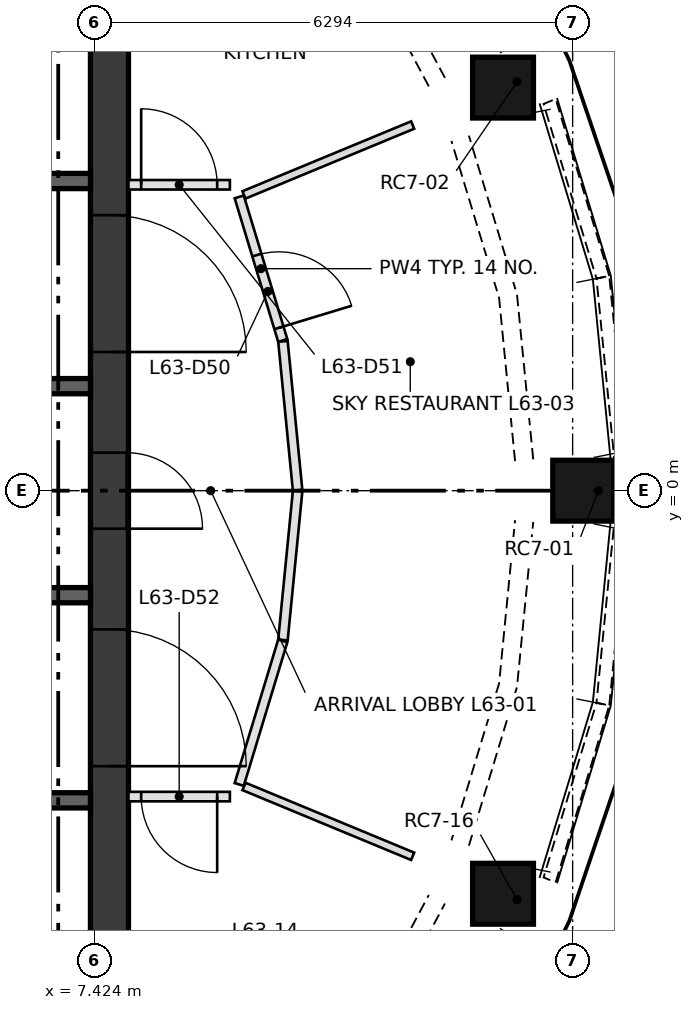
"""IFC4 building model, lengths in metres.
Left out: names, types, materials, properties, quantities, classifications, styles, units other than length and angle.
Written with IfcOpenShell. Run it as: python <this file> out.ifc"""

import sys

from ifc_helpers import new_model, si_unit, direction, frame, frame_2d, origin, origin_2d, place, context, subcontext, project, spatial, polyline, rectangle, outline, extrude, element, fill, save


model = new_model("IFC4")
c1 = context("Model", 3, precision=1e-05, world=origin(), true_north=direction((0.0, 1.0)))
c2 = subcontext(c1, "Body", "Model", "MODEL_VIEW")
j1 = project(units=[si_unit("LENGTHUNIT", "METRE"), si_unit("PLANEANGLEUNIT", "RADIAN")], contexts=[c1])
p1 = place(None, origin())
s1 = spatial("IfcSite", under=j1, at=p1, CompositionType="ELEMENT")
p2 = place(p1, origin())
s2 = spatial("IfcBuilding", under=s1, at=p2, CompositionType="ELEMENT")
p3 = place(p2, frame((0.0, 0.0, 231.2)))
s3 = spatial("IfcBuildingStorey", under=s2, at=p3, CompositionType="ELEMENT", Elevation=231.2)
p4 = place(p3, frame((14.057, 0.0, 0.5), z_axis=(0.0, 0.0, 1.0), x_axis=(0.0, -1.0, 0.0)))
e1 = element("IfcColumn", 1, at=p4, inside=s3, PredefinedType="COLUMN", context=c2, shape_type="SweptSolid", body=[
    extrude(rectangle(XDim=0.8, YDim=0.8, at=origin_2d()), origin(), (0.0, -0.275, 0.962), 3.328),
])
for number, where, z_axis, x_axis in (
    (2, (12.987, 5.379, 0.5), (0.0, 0.0, 1.0), (0.383, -0.924, 0.0)),
    (3, (12.987, -5.379, 0.5), (0.0, 0.0, 1.0), (-0.383, -0.924, 0.0)),
):
    element("IfcColumn", number, at=place(p3, frame(where, z_axis=z_axis, x_axis=x_axis)), inside=s3, PredefinedType="COLUMN", context=c2, shape_type="SweptSolid", body=[
        extrude(rectangle(XDim=0.8, YDim=0.8, at=origin_2d()), origin(), (0.0, -0.275, 0.962), 3.328),
    ])
p5 = place(p3, frame((7.624, -7.374, 0.0), z_axis=(0.0, 0.0, 1.0), x_axis=(0.0, 1.0, 0.0)))
e4 = element("IfcWall", 4, at=p5, inside=s3, PredefinedType="SHEAR", context=c2, shape_type="SweptSolid", body=[
    extrude(rectangle(XDim=14.748, YDim=0.5, at=frame_2d((7.374, 0.0))), origin(), (0.0, 0.0, 1.0), 3.3),
])
p6 = place(p5, frame((6.874, 0.0, 0.0)))
e5 = element("IfcOpeningElement", 5, at=p6, cuts=e4, PredefinedType="OPENING", context=c2, shape_type="SweptSolid", body=[
    extrude(rectangle(XDim=1.0, YDim=2.1, at=frame_2d((0.5, 1.05))), frame((0.0, 0.26, 0.0), z_axis=(0.0, -1.0, 0.0), x_axis=(1.0, 0.0, 0.0)), (0.0, 0.0, 1.0), 0.52),
])
p7 = place(p5, frame((3.75, 0.0, 0.0)))
e6 = element("IfcOpeningElement", 6, at=p7, cuts=e4, PredefinedType="OPENING", context=c2, shape_type="SweptSolid", body=[
    extrude(rectangle(XDim=1.8, YDim=2.1, at=frame_2d((0.9, 1.05))), frame((0.0, 0.26, 0.0), z_axis=(0.0, -1.0, 0.0), x_axis=(1.0, 0.0, 0.0)), (0.0, 0.0, 1.0), 0.52),
])
p8 = place(p5, frame((9.198, 0.0, 0.0)))
e7 = element("IfcOpeningElement", 7, at=p8, cuts=e4, PredefinedType="OPENING", context=c2, shape_type="SweptSolid", body=[
    extrude(rectangle(XDim=1.8, YDim=2.1, at=frame_2d((0.9, 1.05))), frame((0.0, 0.26, 0.0), z_axis=(0.0, -1.0, 0.0), x_axis=(1.0, 0.0, 0.0)), (0.0, 0.0, 1.0), 0.52),
])
p9 = place(p3, frame((-7.374, -4.074, 0.0), z_axis=(0.0, 0.0, 1.0), x_axis=(1.0, 0.0, 0.0)))
e8 = element("IfcWall", 8, at=p9, inside=s3, PredefinedType="SHEAR", context=c2, shape_type="SweptSolid", body=[
    extrude(rectangle(XDim=14.748, YDim=0.2, at=frame_2d((7.374, 0.0))), origin(), (0.0, 0.0, 1.0), 3.3),
])
p10 = place(p9, frame((1.319, 0.0, 0.0)))
e9 = element("IfcOpeningElement", 9, at=p10, cuts=e8, PredefinedType="OPENING", context=c2, shape_type="SweptSolid", body=[
    extrude(rectangle(XDim=1.1, YDim=2.1, at=frame_2d((0.55, 1.05))), frame((0.0, 0.11, 0.0), z_axis=(0.0, -1.0, 0.0), x_axis=(1.0, 0.0, 0.0)), (0.0, 0.0, 1.0), 0.22),
])
p11 = place(p9, frame((4.456, 0.0, 0.0)))
e10 = element("IfcOpeningElement", 10, at=p11, cuts=e8, PredefinedType="OPENING", context=c2, shape_type="SweptSolid", body=[
    extrude(rectangle(XDim=1.1, YDim=2.1, at=frame_2d((0.55, 1.05))), frame((0.0, 0.11, 0.0), z_axis=(0.0, -1.0, 0.0), x_axis=(1.0, 0.0, 0.0)), (0.0, 0.0, 1.0), 0.22),
])
p12 = place(p9, frame((7.689, 0.0, 0.0)))
e11 = element("IfcOpeningElement", 11, at=p12, cuts=e8, PredefinedType="OPENING", context=c2, shape_type="SweptSolid", body=[
    extrude(rectangle(XDim=1.0, YDim=2.1, at=frame_2d((0.5, 1.05))), frame((0.0, 0.11, 0.0), z_axis=(0.0, -1.0, 0.0), x_axis=(1.0, 0.0, 0.0)), (0.0, 0.0, 1.0), 0.22),
])
p13 = place(p9, frame((10.413, 0.0, 0.0)))
e12 = element("IfcOpeningElement", 12, at=p13, cuts=e8, PredefinedType="OPENING", context=c2, shape_type="SweptSolid", body=[
    extrude(rectangle(XDim=1.0, YDim=2.1, at=frame_2d((0.5, 1.05))), frame((0.0, 0.11, 0.0), z_axis=(0.0, -1.0, 0.0), x_axis=(1.0, 0.0, 0.0)), (0.0, 0.0, 1.0), 0.22),
])
p14 = place(p9, frame((12.935, 0.0, 0.0)))
e13 = element("IfcOpeningElement", 13, at=p14, cuts=e8, PredefinedType="OPENING", context=c2, shape_type="SweptSolid", body=[
    extrude(rectangle(XDim=1.0, YDim=2.1, at=frame_2d((0.5, 1.05))), frame((0.0, 0.11, 0.0), z_axis=(0.0, -1.0, 0.0), x_axis=(1.0, 0.0, 0.0)), (0.0, 0.0, 1.0), 0.22),
])
p15 = place(p3, frame((0.0, 4.074, 0.0), z_axis=(0.0, 0.0, 1.0), x_axis=(1.0, 0.0, 0.0)))
e14 = element("IfcWall", 14, at=p15, inside=s3, PredefinedType="SHEAR", context=c2, shape_type="SweptSolid", body=[
    extrude(rectangle(XDim=7.374, YDim=0.2, at=frame_2d((3.687, 0.0))), origin(), (0.0, 0.0, 1.0), 3.3),
])
p16 = place(p15, frame((0.384, 0.0, 0.0)))
e15 = element("IfcOpeningElement", 15, at=p16, cuts=e14, PredefinedType="OPENING", context=c2, shape_type="SweptSolid", body=[
    extrude(rectangle(XDim=1.0, YDim=2.1, at=frame_2d((0.5, 1.05))), frame((0.0, 0.11, 0.0), z_axis=(0.0, -1.0, 0.0), x_axis=(1.0, 0.0, 0.0)), (0.0, 0.0, 1.0), 0.22),
])
p17 = place(p15, frame((2.153, 0.0, 0.0)))
e16 = element("IfcOpeningElement", 16, at=p17, cuts=e14, PredefinedType="OPENING", context=c2, shape_type="SweptSolid", body=[
    extrude(rectangle(XDim=1.0, YDim=2.1, at=frame_2d((0.5, 1.05))), frame((0.0, 0.11, 0.0), z_axis=(0.0, -1.0, 0.0), x_axis=(1.0, 0.0, 0.0)), (0.0, 0.0, 1.0), 0.22),
])
p18 = place(p15, frame((3.921, 0.0, 0.0)))
e17 = element("IfcOpeningElement", 17, at=p18, cuts=e14, PredefinedType="OPENING", context=c2, shape_type="SweptSolid", body=[
    extrude(rectangle(XDim=1.0, YDim=2.1, at=frame_2d((0.5, 1.05))), frame((0.0, 0.11, 0.0), z_axis=(0.0, -1.0, 0.0), x_axis=(1.0, 0.0, 0.0)), (0.0, 0.0, 1.0), 0.22),
])
p19 = place(p15, frame((5.79, 0.0, 0.0)))
e18 = element("IfcOpeningElement", 18, at=p19, cuts=e14, PredefinedType="OPENING", context=c2, shape_type="SweptSolid", body=[
    extrude(rectangle(XDim=0.8, YDim=2.1, at=frame_2d((0.4, 1.05))), frame((0.0, 0.11, 0.0), z_axis=(0.0, -1.0, 0.0), x_axis=(1.0, 0.0, 0.0)), (0.0, 0.0, 1.0), 0.22),
])
for number, where, z_axis, x_axis in (
    (19, (4.374, -1.375, 0.0), (0.0, 0.0, 1.0), (1.0, 0.0, 0.0)),
    (20, (4.374, 1.375, 0.0), (0.0, 0.0, 1.0), (1.0, 0.0, 0.0)),
):
    element("IfcWall", number, at=place(p3, frame(where, z_axis=z_axis, x_axis=x_axis)), inside=s3, PredefinedType="SHEAR", context=c2, shape_type="SweptSolid", body=[
        extrude(rectangle(XDim=3.0, YDim=0.2, at=frame_2d((1.5, 0.0))), origin(), (0.0, 0.0, 1.0), 3.3),
    ])
p20 = place(p3, frame((14.439, 0.403, 0.0), z_axis=(0.93035064291, 0.091755306795, 0.355005133642), x_axis=(-0.098145054237, 0.995172119915, -8.475565e-06)))
e21 = element("IfcWall", 21, at=p20, inside=s3, PredefinedType="SOLIDWALL", context=c2, shape_type="SweptSolid", body=[
    extrude(outline(polyline([(0.0, 0.0), (2.433, -1.388e-17), (2.417, 0.481), (0.017, 0.481), (0.0, 0.0)])), origin(), (0.0, 0.0, -1.0), 0.3),
])
p21 = place(p3, frame((14.2, 2.824, 0.0), z_axis=(0.894721380135, 0.271074750296, 0.354953703573), x_axis=(-0.289959608839, 0.957038883806, 1.1226683e-05)))
e22 = element("IfcWall", 22, at=p21, inside=s3, PredefinedType="SOLIDWALL", context=c2, shape_type="SweptSolid", body=[
    extrude(outline(polyline([(0.0, 0.0), (2.434, -5.551e-17), (2.417, 0.481), (0.017, 0.481), (0.0, 0.0)])), origin(), (0.0, 0.0, -1.0), 0.3),
])
p22 = place(p3, frame((13.186, 5.898, 0.0), z_axis=(0.824332600798, 0.441016524886, 0.35493687895), x_axis=(-0.471734377661, 0.881740708382, 1.0715603e-05)))
e23 = element("IfcWall", 23, at=p22, inside=s3, PredefinedType="SOLIDWALL", context=c2, shape_type="SweptSolid", body=[
    extrude(outline(polyline([(0.0, 0.0), (2.434, 0.0), (2.417, 0.481), (0.017, 0.481), (0.0, 0.0)])), origin(), (0.0, 0.0, -1.0), 0.3),
])
p23 = place(p3, frame((12.038, -8.044, 0.0), z_axis=(0.824402860411, -0.441126603603, 0.354636776631), x_axis=(0.471787066311, 0.881712517728, 1.195964e-05)))
e24 = element("IfcWall", 24, at=p23, inside=s3, PredefinedType="SOLIDWALL", context=c2, shape_type="SweptSolid", body=[
    extrude(outline(polyline([(0.0, 0.0), (2.434, 5.551e-17), (2.417, 0.481), (0.017, 0.481), (0.0, 0.0)])), origin(), (0.0, 0.0, -1.0), 0.3),
])
p24 = place(p3, frame((13.494, -5.154, 0.0), z_axis=(0.894631168658, -0.271094631402, 0.355165838574), x_axis=(0.290000037325, 0.957026634075, 4.815507e-06)))
e25 = element("IfcWall", 25, at=p24, inside=s3, PredefinedType="SOLIDWALL", context=c2, shape_type="SweptSolid", body=[
    extrude(outline(polyline([(0.0, 0.0), (2.434, 0.0), (2.417, 0.481), (0.017, 0.481), (0.0, 0.0)])), origin(), (0.0, 0.0, -1.0), 0.3),
])
p25 = place(p3, frame((14.2, -2.824, 0.0), z_axis=(0.93035064291, -0.091755306795, 0.355005133642), x_axis=(0.098145054237, 0.995172119915, 8.475565e-06)))
e26 = element("IfcWall", 26, at=p25, inside=s3, PredefinedType="SOLIDWALL", context=c2, shape_type="SweptSolid", body=[
    extrude(outline(polyline([(0.0, 0.0), (2.433, 1.388e-17), (2.417, 0.481), (0.017, 0.481), (0.0, 0.0)])), origin(), (0.0, 0.0, -1.0), 0.3),
])
p26 = place(p3, frame((9.331, 3.865, 0.0), z_axis=(0.0, 0.0, 1.0), x_axis=(0.290206520171, -0.956964040939, 0.0)))
e27 = element("IfcWall", 27, at=p26, inside=s3, PredefinedType="PARTITIONING", context=c2, shape_type="SweptSolid", body=[
    extrude(rectangle(XDim=1.974, YDim=0.125, at=frame_2d((0.987, 0.0))), origin(), (0.0, 0.0, 1.0), 3.3),
])
p27 = place(p26, frame((0.8, 0.0, 0.0)))
e28 = element("IfcOpeningElement", 28, at=p27, cuts=e27, PredefinedType="OPENING", context=c2, shape_type="SweptSolid", body=[
    extrude(rectangle(XDim=1.0, YDim=2.1, at=frame_2d((0.5, 1.05))), frame((0.0, 0.073, 0.0), z_axis=(0.0, -1.0, 0.0), x_axis=(1.0, 0.0, 0.0)), (0.0, 0.0, 1.0), 0.145),
])
p28 = place(p3, frame((9.904, -1.976, 0.0), z_axis=(0.0, 0.0, 1.0), x_axis=(-0.290206520171, -0.956964040939, 0.0)))
e29 = element("IfcWall", 29, at=p28, inside=s3, PredefinedType="PARTITIONING", context=c2, shape_type="SweptSolid", body=[
    extrude(rectangle(XDim=1.974, YDim=0.125, at=frame_2d((0.987, 0.0))), origin(), (0.0, 0.0, 1.0), 3.3),
])
for number, where, z_axis, x_axis in (
    (30, (9.906, 1.964, 0.0), (0.0, 0.0, 1.0), (0.098, -0.995, 0.0)),
    (31, (10.099, -0.006, 0.0), (0.0, 0.0, 1.0), (-0.098, -0.995, 0.0)),
):
    element("IfcWall", number, at=place(p3, frame(where, z_axis=z_axis, x_axis=x_axis)), inside=s3, PredefinedType="PARTITIONING", context=c2, shape_type="SweptSolid", body=[
        extrude(rectangle(XDim=1.968, YDim=0.125, at=frame_2d((0.984, 0.0))), origin(), (0.0, 0.0, 1.0), 3.3),
    ])
p29 = place(p3, frame((7.874, 4.024, 0.0), z_axis=(0.0, 0.0, 1.0), x_axis=(1.0, 0.0, 0.0)))
e32 = element("IfcWall", 32, at=p29, inside=s3, PredefinedType="PARTITIONING", context=c2, shape_type="SweptSolid", body=[
    extrude(rectangle(XDim=1.334, YDim=0.125, at=frame_2d((0.667, 0.0))), origin(), (0.0, 0.0, 1.0), 3.3),
])
p30 = place(p29, frame((0.167, 0.0, 0.0)))
e33 = element("IfcOpeningElement", 33, at=p30, cuts=e32, PredefinedType="OPENING", context=c2, shape_type="SweptSolid", body=[
    extrude(rectangle(XDim=1.0, YDim=2.1, at=frame_2d((0.5, 1.05))), frame((0.0, 0.073, 0.0), z_axis=(0.0, -1.0, 0.0), x_axis=(1.0, 0.0, 0.0)), (0.0, 0.0, 1.0), 0.145),
])
p31 = place(p3, frame((9.208, -4.024, 0.0), z_axis=(0.0, 0.0, 1.0), x_axis=(-1.0, 0.0, 0.0)))
e34 = element("IfcWall", 34, at=p31, inside=s3, PredefinedType="PARTITIONING", context=c2, shape_type="SweptSolid", body=[
    extrude(rectangle(XDim=1.334, YDim=0.125, at=frame_2d((0.667, 0.0))), origin(), (0.0, 0.0, 1.0), 3.3),
])
p32 = place(p31, frame((0.167, 0.0, 0.0)))
e35 = element("IfcOpeningElement", 35, at=p32, cuts=e34, PredefinedType="OPENING", context=c2, shape_type="SweptSolid", body=[
    extrude(rectangle(XDim=1.0, YDim=2.1, at=frame_2d((0.5, 1.05))), frame((0.0, 0.073, 0.0), z_axis=(0.0, -1.0, 0.0), x_axis=(1.0, 0.0, 0.0)), (0.0, 0.0, 1.0), 0.145),
])
for number, where, z_axis, x_axis in (
    (36, (9.394, 3.891, 0.0), (0.0, 0.0, 1.0), (0.924, 0.383, 0.0)),
    (37, (11.613, -4.81, 0.0), (0.0, 0.0, 1.0), (-0.924, 0.383, 0.0)),
):
    element("IfcWall", number, at=place(p3, frame(where, z_axis=z_axis, x_axis=x_axis)), inside=s3, PredefinedType="PARTITIONING", context=c2, shape_type="SweptSolid", body=[
        extrude(rectangle(XDim=2.402, YDim=0.105, at=frame_2d((1.201, 0.0))), origin(), (0.0, 0.0, 1.0), 3.3),
    ])
p33 = place(p6, frame((1.0, 0.0, 0.0), z_axis=(0.0, 0.0, 1.0), x_axis=(-1.0, 0.0, 0.0)))
e38 = element("IfcDoor", 38, at=p33, inside=s3, OperationType="SINGLE_SWING_LEFT", PredefinedType="DOOR", context=c2, shape_type="SweptSolid", body=[
    extrude(rectangle(XDim=1.0, YDim=2.1, at=frame_2d((0.5, 1.05))), frame((0.0, 0.25, 0.0), z_axis=(0.0, -1.0, 0.0), x_axis=(1.0, 0.0, 0.0)), (0.0, 0.0, 1.0), 0.05),
])
fill(e5, e38)
p34 = place(p7, frame((1.8, 0.0, 0.0), z_axis=(0.0, 0.0, 1.0), x_axis=(-1.0, 0.0, 0.0)))
e39 = element("IfcDoor", 39, at=p34, inside=s3, OperationType="DOUBLE_DOOR_SINGLE_SWING", PredefinedType="DOOR", context=c2, shape_type="SweptSolid", body=[
    extrude(rectangle(XDim=1.8, YDim=2.1, at=frame_2d((0.9, 1.05))), frame((0.0, 0.025, 0.0), z_axis=(0.0, -1.0, 0.0), x_axis=(1.0, 0.0, 0.0)), (0.0, 0.0, 1.0), 0.05),
])
fill(e6, e39)
p35 = place(p8, frame((1.8, 0.0, 0.0), z_axis=(0.0, 0.0, 1.0), x_axis=(-1.0, 0.0, 0.0)))
e40 = element("IfcDoor", 40, at=p35, inside=s3, OperationType="DOUBLE_DOOR_SINGLE_SWING", PredefinedType="DOOR", context=c2, shape_type="SweptSolid", body=[
    extrude(rectangle(XDim=1.8, YDim=2.1, at=frame_2d((0.9, 1.05))), frame((0.0, 0.025, 0.0), z_axis=(0.0, -1.0, 0.0), x_axis=(1.0, 0.0, 0.0)), (0.0, 0.0, 1.0), 0.05),
])
fill(e7, e40)
p36 = place(p27, origin())
e41 = element("IfcDoor", 41, at=p36, inside=s3, OperationType="SINGLE_SWING_RIGHT", PredefinedType="DOOR", context=c2, shape_type="SweptSolid", body=[
    extrude(rectangle(XDim=1.0, YDim=2.1, at=frame_2d((0.5, 1.05))), frame((0.0, 0.025, 0.0), z_axis=(0.0, -1.0, 0.0), x_axis=(1.0, 0.0, 0.0)), (0.0, 0.0, 1.0), 0.05),
])
fill(e28, e41)
p37 = place(p30, origin())
e42 = element("IfcDoor", 42, at=p37, inside=s3, OperationType="SINGLE_SWING_LEFT", PredefinedType="DOOR", context=c2, shape_type="SweptSolid", body=[
    extrude(rectangle(XDim=1.0, YDim=2.1, at=frame_2d((0.5, 1.05))), frame((0.0, 0.025, 0.0), z_axis=(0.0, -1.0, 0.0), x_axis=(1.0, 0.0, 0.0)), (0.0, 0.0, 1.0), 0.05),
])
fill(e33, e42)
p38 = place(p32, origin())
e43 = element("IfcDoor", 43, at=p38, inside=s3, OperationType="SINGLE_SWING_LEFT", PredefinedType="DOOR", context=c2, shape_type="SweptSolid", body=[
    extrude(rectangle(XDim=1.0, YDim=2.1, at=frame_2d((0.5, 1.05))), frame((0.0, 0.025, 0.0), z_axis=(0.0, -1.0, 0.0), x_axis=(1.0, 0.0, 0.0)), (0.0, 0.0, 1.0), 0.05),
])
fill(e35, e43)
save(model, sys.argv[1])
